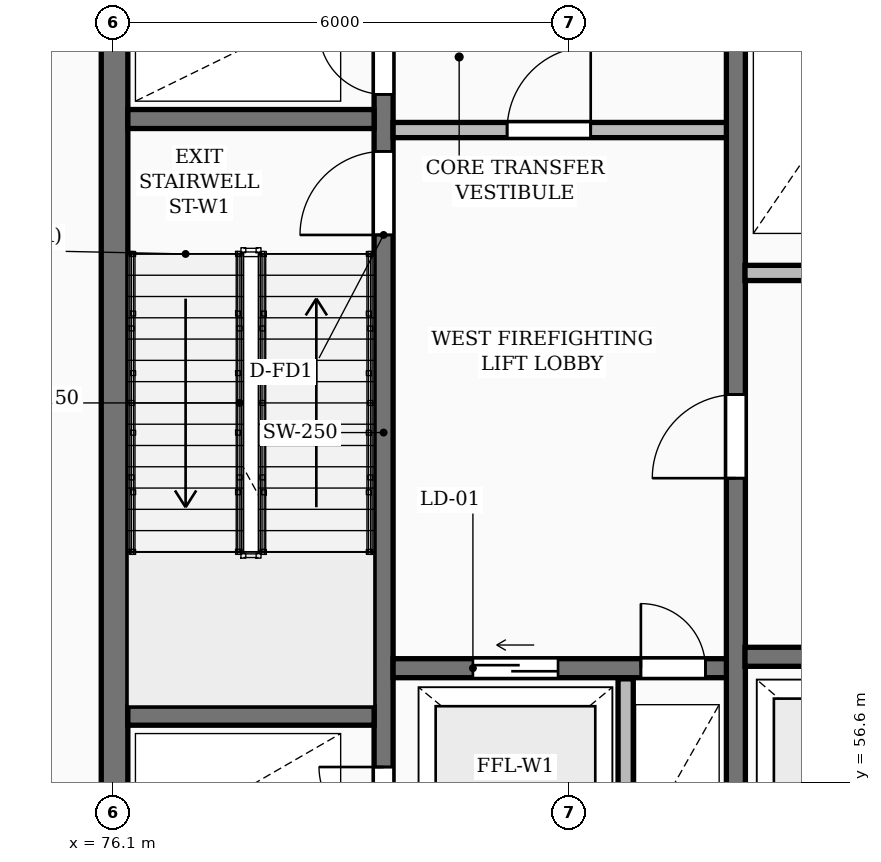
"""IFC4 building model, lengths in metres.
Left out: names, types, materials, properties, quantities, classifications, styles, units other than length and angle.
Written with IfcOpenShell. Run it as: python <this file> out.ifc"""

import sys

from ifc_helpers import new_model, si_unit, direction, frame, frame_2d, origin, place, context, subcontext, project, spatial, rectangle, extrude, element, fill, save


model = new_model("IFC4")
c1 = context("Model", 3, precision=1e-05, world=origin(), true_north=direction((0.0, 1.0)))
c2 = subcontext(c1, "Body", "Model", "MODEL_VIEW")
j1 = project(units=[si_unit("LENGTHUNIT", "METRE"), si_unit("PLANEANGLEUNIT", "RADIAN")], contexts=[c1])
p1 = place(None, origin())
s1 = spatial("IfcSite", under=j1, at=p1, CompositionType="ELEMENT")
p2 = place(p1, origin())
s2 = spatial("IfcBuilding", under=s1, at=p2, CompositionType="ELEMENT")
p3 = place(p2, origin())
s3 = spatial("IfcBuildingStorey", under=s2, at=p3, CompositionType="ELEMENT", Elevation=0.0)
p4 = place(p3, frame((76.125, 55.375, 0.0), z_axis=(0.0, 0.0, 1.0), x_axis=(0.0, 1.0, 0.0)))
e1 = element("IfcWall", 1, at=p4, inside=s3, PredefinedType="SHEAR", context=c2, shape_type="SweptSolid", body=[
    extrude(rectangle(XDim=11.65, YDim=0.35, at=frame_2d((5.825, 0.0))), origin(), (0.0, 0.0, 1.0), 5.4),
])
p5 = place(p3, frame((79.665, 55.4, 0.0), z_axis=(0.0, 0.0, 1.0), x_axis=(0.0, 1.0, 0.0)))
e2 = element("IfcWall", 2, at=p5, inside=s3, PredefinedType="SHEAR", context=c2, shape_type="SweptSolid", body=[
    extrude(rectangle(XDim=11.6, YDim=0.25, at=frame_2d((5.8, 0.0))), origin(), (0.0, 0.0, 1.0), 5.4),
])
p6 = place(p5, frame((0.55, 0.0, 0.0)))
e3 = element("IfcOpeningElement", 3, at=p6, cuts=e2, PredefinedType="OPENING", context=c2, shape_type="SweptSolid", body=[
    extrude(rectangle(XDim=0.85, YDim=2.05, at=frame_2d((0.425, 1.025))), frame((0.0, 0.135, 0.0), z_axis=(0.0, -1.0, 0.0), x_axis=(1.0, 0.0, 0.0)), (0.0, 0.0, 1.0), 0.27),
])
p7 = place(p5, frame((8.4, 0.0, 0.0)))
e4 = element("IfcOpeningElement", 4, at=p7, cuts=e2, PredefinedType="OPENING", context=c2, shape_type="SweptSolid", body=[
    extrude(rectangle(XDim=1.1, YDim=2.1, at=frame_2d((0.55, 1.05))), frame((0.0, 0.135, 0.0), z_axis=(0.0, -1.0, 0.0), x_axis=(1.0, 0.0, 0.0)), (0.0, 0.0, 1.0), 0.27),
])
p8 = place(p5, frame((10.25, 0.0, 0.0)))
e5 = element("IfcOpeningElement", 5, at=p8, cuts=e2, PredefinedType="OPENING", context=c2, shape_type="SweptSolid", body=[
    extrude(rectangle(XDim=0.85, YDim=2.05, at=frame_2d((0.425, 1.025))), frame((0.0, 0.135, 0.0), z_axis=(0.0, -1.0, 0.0), x_axis=(1.0, 0.0, 0.0)), (0.0, 0.0, 1.0), 0.27),
])
for number, where, z_axis, x_axis in (
    (6, (76.3, 57.475, 0.0), (0.0, 0.0, 1.0), (1.0, 0.0, 0.0)),
    (7, (76.3, 65.325, 0.0), (0.0, 0.0, 1.0), (1.0, 0.0, 0.0)),
):
    element("IfcWall", number, at=place(p3, frame(where, z_axis=z_axis, x_axis=x_axis)), inside=s3, PredefinedType="SHEAR", context=c2, shape_type="SweptSolid", body=[
        extrude(rectangle(XDim=3.24, YDim=0.25, at=frame_2d((1.62, 0.0))), origin(), (0.0, 0.0, 1.0), 5.4),
    ])
p9 = place(p3, frame((79.79, 58.1, 0.0), z_axis=(0.0, 0.0, 1.0), x_axis=(1.0, 0.0, 0.0)))
e8 = element("IfcWall", 8, at=p9, inside=s3, PredefinedType="SHEAR", context=c2, shape_type="SweptSolid", body=[
    extrude(rectangle(XDim=4.39, YDim=0.25, at=frame_2d((2.195, 0.0))), origin(), (0.0, 0.0, 1.0), 5.4),
])
p10 = place(p9, frame((1.05, 0.0, 0.0)))
e9 = element("IfcOpeningElement", 9, at=p10, cuts=e8, PredefinedType="OPENING", context=c2, shape_type="SweptSolid", body=[
    extrude(rectangle(XDim=1.12, YDim=2.12, at=frame_2d((0.56, 1.06))), frame((0.0, 0.135, 0.0), z_axis=(0.0, -1.0, 0.0), x_axis=(1.0, 0.0, 0.0)), (0.0, 0.0, 1.0), 0.27),
])
p11 = place(p9, frame((3.26, 0.0, 0.0)))
e10 = element("IfcOpeningElement", 10, at=p11, cuts=e8, PredefinedType="OPENING", context=c2, shape_type="SweptSolid", body=[
    extrude(rectangle(XDim=0.85, YDim=2.05, at=frame_2d((0.425, 1.025))), frame((0.0, 0.135, 0.0), z_axis=(0.0, -1.0, 0.0), x_axis=(1.0, 0.0, 0.0)), (0.0, 0.0, 1.0), 0.27),
])
p12 = place(p3, frame((82.85, 55.4, 0.0), z_axis=(0.0, 0.0, 1.0), x_axis=(0.0, 1.0, 0.0)))
e11 = element("IfcWall", 11, at=p12, inside=s3, PredefinedType="PARTITIONING", context=c2, shape_type="SweptSolid", body=[
    extrude(rectangle(XDim=2.56, YDim=0.2, at=frame_2d((1.28, 0.0))), origin(), (0.0, 0.0, 1.0), 5.1),
])
p13 = place(p3, frame((79.79, 65.18, 0.0), z_axis=(0.0, 0.0, 1.0), x_axis=(1.0, 0.0, 0.0)))
e12 = element("IfcWall", 12, at=p13, inside=s3, PredefinedType="PARTITIONING", context=c2, shape_type="SweptSolid", body=[
    extrude(rectangle(XDim=4.39, YDim=0.2, at=frame_2d((2.195, 0.0))), origin(), (0.0, 0.0, 1.0), 5.1),
])
p14 = place(p13, frame((1.5, 0.0, 0.0)))
e13 = element("IfcOpeningElement", 13, at=p14, cuts=e12, PredefinedType="OPENING", context=c2, shape_type="SweptSolid", body=[
    extrude(rectangle(XDim=1.1, YDim=2.1, at=frame_2d((0.55, 1.05))), frame((0.0, 0.11, 0.0), z_axis=(0.0, -1.0, 0.0), x_axis=(1.0, 0.0, 0.0)), (0.0, 0.0, 1.0), 0.22),
])
p15 = place(p3, frame((84.3, 55.4, 0.0), z_axis=(0.0, 0.0, 1.0), x_axis=(0.0, 1.0, 0.0)))
e14 = element("IfcWall", 14, at=p15, inside=s3, PredefinedType="SHEAR", context=c2, shape_type="SweptSolid", body=[
    extrude(rectangle(XDim=11.6, YDim=0.25, at=frame_2d((5.8, 0.0))), origin(), (0.0, 0.0, 1.0), 5.4),
])
p16 = place(p15, frame((5.2, 0.0, 0.0)))
e15 = element("IfcOpeningElement", 15, at=p16, cuts=e14, PredefinedType="OPENING", context=c2, shape_type="SweptSolid", body=[
    extrude(rectangle(XDim=1.1, YDim=2.1, at=frame_2d((0.55, 1.05))), frame((0.0, 0.135, 0.0), z_axis=(0.0, -1.0, 0.0), x_axis=(1.0, 0.0, 0.0)), (0.0, 0.0, 1.0), 0.27),
])
p17 = place(p3, frame((84.42, 58.25, 0.0), z_axis=(0.0, 0.0, 1.0), x_axis=(1.0, 0.0, 0.0)))
e16 = element("IfcWall", 16, at=p17, inside=s3, PredefinedType="SHEAR", context=c2, shape_type="SweptSolid", body=[
    extrude(rectangle(XDim=8.36, YDim=0.25, at=frame_2d((4.18, 0.0))), origin(), (0.0, 0.0, 1.0), 5.4),
])
p18 = place(p17, frame((0.82, 0.0, 0.0)))
e17 = element("IfcOpeningElement", 17, at=p18, cuts=e16, PredefinedType="OPENING", context=c2, shape_type="SweptSolid", body=[
    extrude(rectangle(XDim=1.12, YDim=2.12, at=frame_2d((0.56, 1.06))), frame((0.0, 0.135, 0.0), z_axis=(0.0, -1.0, 0.0), x_axis=(1.0, 0.0, 0.0)), (0.0, 0.0, 1.0), 0.27),
])
p19 = place(p17, frame((3.62, 0.0, 0.0)))
e18 = element("IfcOpeningElement", 18, at=p19, cuts=e16, PredefinedType="OPENING", context=c2, shape_type="SweptSolid", body=[
    extrude(rectangle(XDim=1.12, YDim=2.12, at=frame_2d((0.56, 1.06))), frame((0.0, 0.135, 0.0), z_axis=(0.0, -1.0, 0.0), x_axis=(1.0, 0.0, 0.0)), (0.0, 0.0, 1.0), 0.27),
])
p20 = place(p17, frame((6.42, 0.0, 0.0)))
e19 = element("IfcOpeningElement", 19, at=p20, cuts=e16, PredefinedType="OPENING", context=c2, shape_type="SweptSolid", body=[
    extrude(rectangle(XDim=1.12, YDim=2.12, at=frame_2d((0.56, 1.06))), frame((0.0, 0.135, 0.0), z_axis=(0.0, -1.0, 0.0), x_axis=(1.0, 0.0, 0.0)), (0.0, 0.0, 1.0), 0.27),
])
p21 = place(p3, frame((84.42, 63.3, 0.0), z_axis=(0.0, 0.0, 1.0), x_axis=(1.0, 0.0, 0.0)))
e20 = element("IfcWall", 20, at=p21, inside=s3, PredefinedType="PARTITIONING", context=c2, shape_type="SweptSolid", body=[
    extrude(rectangle(XDim=19.83, YDim=0.2, at=frame_2d((9.915, 0.0))), origin(), (0.0, 0.0, 1.0), 5.1),
])
p22 = place(p21, frame((1.15, 0.0, 0.0)))
e21 = element("IfcOpeningElement", 21, at=p22, cuts=e20, PredefinedType="OPENING", context=c2, shape_type="SweptSolid", body=[
    extrude(rectangle(XDim=0.85, YDim=2.05, at=frame_2d((0.425, 1.025))), frame((0.0, 0.11, 0.0), z_axis=(0.0, -1.0, 0.0), x_axis=(1.0, 0.0, 0.0)), (0.0, 0.0, 1.0), 0.22),
])
p23 = place(p21, frame((3.25, 0.0, 0.0)))
e22 = element("IfcOpeningElement", 22, at=p23, cuts=e20, PredefinedType="OPENING", context=c2, shape_type="SweptSolid", body=[
    extrude(rectangle(XDim=0.85, YDim=2.05, at=frame_2d((0.425, 1.025))), frame((0.0, 0.11, 0.0), z_axis=(0.0, -1.0, 0.0), x_axis=(1.0, 0.0, 0.0)), (0.0, 0.0, 1.0), 0.22),
])
p24 = place(p21, frame((13.08, 0.0, 0.0)))
e23 = element("IfcOpeningElement", 23, at=p24, cuts=e20, PredefinedType="OPENING", context=c2, shape_type="SweptSolid", body=[
    extrude(rectangle(XDim=1.5, YDim=2.2, at=frame_2d((0.75, 1.1))), frame((0.0, 0.11, 0.0), z_axis=(0.0, -1.0, 0.0), x_axis=(1.0, 0.0, 0.0)), (0.0, 0.0, 1.0), 0.22),
])
p25 = place(p21, frame((6.78, 0.0, 0.0)))
e24 = element("IfcOpeningElement", 24, at=p25, cuts=e20, PredefinedType="OPENING", context=c2, shape_type="SweptSolid", body=[
    extrude(rectangle(XDim=0.92, YDim=2.08, at=frame_2d((0.46, 1.04))), frame((0.0, 0.11, 0.0), z_axis=(0.0, -1.0, 0.0), x_axis=(1.0, 0.0, 0.0)), (0.0, 0.0, 1.0), 0.22),
])
p26 = place(p21, frame((16.28, 0.0, 0.0)))
e25 = element("IfcOpeningElement", 25, at=p26, cuts=e20, PredefinedType="OPENING", context=c2, shape_type="SweptSolid", body=[
    extrude(rectangle(XDim=0.92, YDim=2.08, at=frame_2d((0.46, 1.04))), frame((0.0, 0.11, 0.0), z_axis=(0.0, -1.0, 0.0), x_axis=(1.0, 0.0, 0.0)), (0.0, 0.0, 1.0), 0.22),
])
p27 = place(p6, origin())
e26 = element("IfcDoor", 26, at=p27, inside=s3, OperationType="SINGLE_SWING_RIGHT", PredefinedType="DOOR", context=c2, shape_type="SweptSolid", body=[
    extrude(rectangle(XDim=0.85, YDim=2.05, at=frame_2d((0.425, 1.025))), frame((0.0, 0.025, 0.0), z_axis=(0.0, -1.0, 0.0), x_axis=(1.0, 0.0, 0.0)), (0.0, 0.0, 1.0), 0.05),
])
fill(e3, e26)
p28 = place(p7, origin())
e27 = element("IfcDoor", 27, at=p28, inside=s3, OperationType="SINGLE_SWING_LEFT", PredefinedType="DOOR", context=c2, shape_type="SweptSolid", body=[
    extrude(rectangle(XDim=1.1, YDim=2.1, at=frame_2d((0.55, 1.05))), frame((0.0, 0.025, 0.0), z_axis=(0.0, -1.0, 0.0), x_axis=(1.0, 0.0, 0.0)), (0.0, 0.0, 1.0), 0.05),
])
fill(e4, e27)
p29 = place(p8, origin())
e28 = element("IfcDoor", 28, at=p29, inside=s3, OperationType="SINGLE_SWING_RIGHT", PredefinedType="DOOR", context=c2, shape_type="SweptSolid", body=[
    extrude(rectangle(XDim=0.85, YDim=2.05, at=frame_2d((0.425, 1.025))), frame((0.0, 0.025, 0.0), z_axis=(0.0, -1.0, 0.0), x_axis=(1.0, 0.0, 0.0)), (0.0, 0.0, 1.0), 0.05),
])
fill(e5, e28)
p30 = place(p10, origin())
e29 = element("IfcDoor", 29, at=p30, inside=s3, OperationType="SLIDING_TO_LEFT", PredefinedType="DOOR", context=c2, shape_type="SweptSolid", body=[
    extrude(rectangle(XDim=1.12, YDim=2.12, at=frame_2d((0.56, 1.06))), frame((0.0, 0.025, 0.0), z_axis=(0.0, -1.0, 0.0), x_axis=(1.0, 0.0, 0.0)), (0.0, 0.0, 1.0), 0.05),
])
fill(e9, e29)
p31 = place(p11, origin())
e30 = element("IfcDoor", 30, at=p31, inside=s3, OperationType="SINGLE_SWING_LEFT", PredefinedType="DOOR", context=c2, shape_type="SweptSolid", body=[
    extrude(rectangle(XDim=0.85, YDim=2.05, at=frame_2d((0.425, 1.025))), frame((0.0, 0.025, 0.0), z_axis=(0.0, -1.0, 0.0), x_axis=(1.0, 0.0, 0.0)), (0.0, 0.0, 1.0), 0.05),
])
fill(e10, e30)
p32 = place(p14, origin())
e31 = element("IfcDoor", 31, at=p32, inside=s3, OperationType="SINGLE_SWING_RIGHT", PredefinedType="DOOR", context=c2, shape_type="SweptSolid", body=[
    extrude(rectangle(XDim=1.1, YDim=2.1, at=frame_2d((0.55, 1.05))), frame((0.0, 0.025, 0.0), z_axis=(0.0, -1.0, 0.0), x_axis=(1.0, 0.0, 0.0)), (0.0, 0.0, 1.0), 0.05),
])
fill(e13, e31)
p33 = place(p16, origin())
e32 = element("IfcDoor", 32, at=p33, inside=s3, OperationType="SINGLE_SWING_LEFT", PredefinedType="DOOR", context=c2, shape_type="SweptSolid", body=[
    extrude(rectangle(XDim=1.1, YDim=2.1, at=frame_2d((0.55, 1.05))), frame((0.0, 0.025, 0.0), z_axis=(0.0, -1.0, 0.0), x_axis=(1.0, 0.0, 0.0)), (0.0, 0.0, 1.0), 0.05),
])
fill(e15, e32)
save(model, sys.argv[1])
